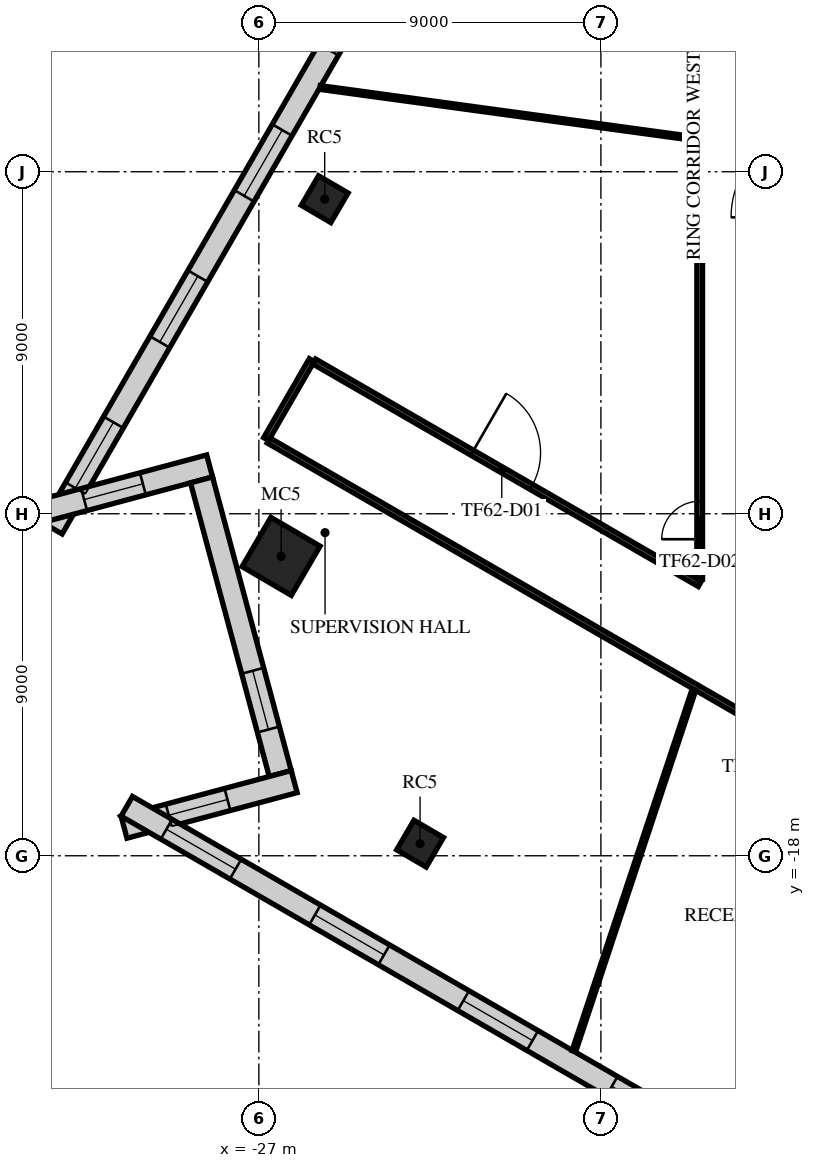
"""IFC4 building model, lengths in metres.
Left out: names, types, materials, properties, quantities, classifications, styles, units other than length and angle.
Written with IfcOpenShell. Run it as: python <this file> out.ifc"""

import sys

from ifc_helpers import new_model, si_unit, direction, frame, frame_2d, origin, origin_2d, place, context, subcontext, project, spatial, rectangle, extrude, element, fill, save


model = new_model("IFC4")
c1 = context("Model", 3, precision=1e-05, world=origin(), true_north=direction((0.0, 1.0)))
c2 = subcontext(c1, "Body", "Model", "MODEL_VIEW")
j1 = project(units=[si_unit("LENGTHUNIT", "METRE"), si_unit("PLANEANGLEUNIT", "RADIAN")], contexts=[c1])
p1 = place(None, origin())
s1 = spatial("IfcSite", under=j1, at=p1, CompositionType="ELEMENT")
p2 = place(p1, origin())
s2 = spatial("IfcBuilding", under=s1, at=p2, CompositionType="ELEMENT")
p3 = place(p2, frame((0.0, 0.0, 262.9)))
s3 = spatial("IfcBuildingStorey", under=s2, at=p3, CompositionType="ELEMENT", Elevation=262.9)
p4 = place(p3, frame((-25.268, -0.722, 0.0), z_axis=(0.0, 0.0, 1.0), x_axis=(0.504643651291, 0.863327739165, 0.0)))
e1 = element("IfcColumn", 1, at=p4, inside=s3, PredefinedType="COLUMN", context=c2, shape_type="SweptSolid", body=[
    extrude(rectangle(XDim=0.9, YDim=0.9, at=origin_2d()), origin(), (0.0, 0.0, 1.0), 4.0),
])
p5 = place(p3, frame((-26.415, -10.122, 0.0), z_axis=(0.0, 0.0, 1.0), x_axis=(0.504643651291, 0.863327739165, 0.0)))
e2 = element("IfcColumn", 2, at=p5, inside=s3, PredefinedType="COLUMN", context=c2, shape_type="SweptSolid", body=[
    extrude(rectangle(XDim=1.5, YDim=1.5, at=origin_2d()), origin(), (0.0, 0.0, 1.0), 4.0),
])
p6 = place(p3, frame((-22.758, -17.682, 0.0), z_axis=(0.0, 0.0, 1.0), x_axis=(0.504643651291, 0.863327739165, 0.0)))
e3 = element("IfcColumn", 3, at=p6, inside=s3, PredefinedType="COLUMN", context=c2, shape_type="SweptSolid", body=[
    extrude(rectangle(XDim=0.9, YDim=0.9, at=origin_2d()), origin(), (0.0, 0.0, 1.0), 4.0),
])
p7 = place(p3, frame((-8.015, 32.917, 0.0), z_axis=(0.0, 0.0, 1.0), x_axis=(-0.500001675963, -0.866024436165, 0.0)))
e4 = element("IfcWall", 4, at=p7, inside=s3, PredefinedType="STANDARD", context=c2, shape_type="SweptSolid", body=[
    extrude(rectangle(XDim=48.843, YDim=0.6, at=frame_2d((24.421, 0.0))), origin(), (0.0, 0.0, 1.0), 3.64),
])
p8 = place(p7, frame((1.22, 0.0, 0.9)))
e5 = element("IfcOpeningElement", 5, at=p8, cuts=e4, PredefinedType="OPENING", context=c2, shape_type="SweptSolid", body=[
    extrude(rectangle(XDim=2.0, YDim=2.1, at=frame_2d((1.0, 1.05))), frame((0.0, 0.31, 0.0), z_axis=(0.0, -1.0, 0.0), x_axis=(1.0, 0.0, 0.0)), (0.0, 0.0, 1.0), 0.62),
])
p9 = place(p7, frame((5.66, 0.0, 0.9)))
e6 = element("IfcOpeningElement", 6, at=p9, cuts=e4, PredefinedType="OPENING", context=c2, shape_type="SweptSolid", body=[
    extrude(rectangle(XDim=2.0, YDim=2.1, at=frame_2d((1.0, 1.05))), frame((0.0, 0.31, 0.0), z_axis=(0.0, -1.0, 0.0), x_axis=(1.0, 0.0, 0.0)), (0.0, 0.0, 1.0), 0.62),
])
p10 = place(p7, frame((10.101, 0.0, 0.9)))
e7 = element("IfcOpeningElement", 7, at=p10, cuts=e4, PredefinedType="OPENING", context=c2, shape_type="SweptSolid", body=[
    extrude(rectangle(XDim=2.0, YDim=2.1, at=frame_2d((1.0, 1.05))), frame((0.0, 0.31, 0.0), z_axis=(0.0, -1.0, 0.0), x_axis=(1.0, 0.0, 0.0)), (0.0, 0.0, 1.0), 0.62),
])
p11 = place(p7, frame((14.541, 0.0, 0.9)))
e8 = element("IfcOpeningElement", 8, at=p11, cuts=e4, PredefinedType="OPENING", context=c2, shape_type="SweptSolid", body=[
    extrude(rectangle(XDim=2.0, YDim=2.1, at=frame_2d((1.0, 1.05))), frame((0.0, 0.31, 0.0), z_axis=(0.0, -1.0, 0.0), x_axis=(1.0, 0.0, 0.0)), (0.0, 0.0, 1.0), 0.62),
])
p12 = place(p7, frame((18.981, 0.0, 0.9)))
e9 = element("IfcOpeningElement", 9, at=p12, cuts=e4, PredefinedType="OPENING", context=c2, shape_type="SweptSolid", body=[
    extrude(rectangle(XDim=2.0, YDim=2.1, at=frame_2d((1.0, 1.05))), frame((0.0, 0.31, 0.0), z_axis=(0.0, -1.0, 0.0), x_axis=(1.0, 0.0, 0.0)), (0.0, 0.0, 1.0), 0.62),
])
p13 = place(p7, frame((23.422, 0.0, 0.9)))
e10 = element("IfcOpeningElement", 10, at=p13, cuts=e4, PredefinedType="OPENING", context=c2, shape_type="SweptSolid", body=[
    extrude(rectangle(XDim=2.0, YDim=2.1, at=frame_2d((1.0, 1.05))), frame((0.0, 0.31, 0.0), z_axis=(0.0, -1.0, 0.0), x_axis=(1.0, 0.0, 0.0)), (0.0, 0.0, 1.0), 0.62),
])
p14 = place(p7, frame((27.862, 0.0, 0.9)))
e11 = element("IfcOpeningElement", 11, at=p14, cuts=e4, PredefinedType="OPENING", context=c2, shape_type="SweptSolid", body=[
    extrude(rectangle(XDim=2.0, YDim=2.1, at=frame_2d((1.0, 1.05))), frame((0.0, 0.31, 0.0), z_axis=(0.0, -1.0, 0.0), x_axis=(1.0, 0.0, 0.0)), (0.0, 0.0, 1.0), 0.62),
])
p15 = place(p7, frame((32.302, 0.0, 0.9)))
e12 = element("IfcOpeningElement", 12, at=p15, cuts=e4, PredefinedType="OPENING", context=c2, shape_type="SweptSolid", body=[
    extrude(rectangle(XDim=2.0, YDim=2.1, at=frame_2d((1.0, 1.05))), frame((0.0, 0.31, 0.0), z_axis=(0.0, -1.0, 0.0), x_axis=(1.0, 0.0, 0.0)), (0.0, 0.0, 1.0), 0.62),
])
p16 = place(p7, frame((36.742, 0.0, 0.9)))
e13 = element("IfcOpeningElement", 13, at=p16, cuts=e4, PredefinedType="OPENING", context=c2, shape_type="SweptSolid", body=[
    extrude(rectangle(XDim=2.0, YDim=2.1, at=frame_2d((1.0, 1.05))), frame((0.0, 0.31, 0.0), z_axis=(0.0, -1.0, 0.0), x_axis=(1.0, 0.0, 0.0)), (0.0, 0.0, 1.0), 0.62),
])
p17 = place(p7, frame((41.183, 0.0, 0.9)))
e14 = element("IfcOpeningElement", 14, at=p17, cuts=e4, PredefinedType="OPENING", context=c2, shape_type="SweptSolid", body=[
    extrude(rectangle(XDim=2.0, YDim=2.1, at=frame_2d((1.0, 1.05))), frame((0.0, 0.31, 0.0), z_axis=(0.0, -1.0, 0.0), x_axis=(1.0, 0.0, 0.0)), (0.0, 0.0, 1.0), 0.62),
])
p18 = place(p7, frame((45.623, 0.0, 0.9)))
e15 = element("IfcOpeningElement", 15, at=p18, cuts=e4, PredefinedType="OPENING", context=c2, shape_type="SweptSolid", body=[
    extrude(rectangle(XDim=2.0, YDim=2.1, at=frame_2d((1.0, 1.05))), frame((0.0, 0.31, 0.0), z_axis=(0.0, -1.0, 0.0), x_axis=(1.0, 0.0, 0.0)), (0.0, 0.0, 1.0), 0.62),
])
p19 = place(p3, frame((-32.774, -8.942, 0.0), z_axis=(0.0, 0.0, 1.0), x_axis=(0.965928304125, 0.258809797517, 0.0)))
e16 = element("IfcWall", 16, at=p19, inside=s3, PredefinedType="STANDARD", context=c2, shape_type="SweptSolid", body=[
    extrude(rectangle(XDim=4.635, YDim=0.6, at=frame_2d((2.318, 0.0))), origin(), (0.0, 0.0, 1.0), 3.64),
])
p20 = place(p19, frame((1.218, 0.0, 0.9)))
e17 = element("IfcOpeningElement", 17, at=p20, cuts=e16, PredefinedType="OPENING", context=c2, shape_type="SweptSolid", body=[
    extrude(rectangle(XDim=1.6, YDim=2.1, at=frame_2d((0.8, 1.05))), frame((0.0, 0.31, 0.0), z_axis=(0.0, -1.0, 0.0), x_axis=(1.0, 0.0, 0.0)), (0.0, 0.0, 1.0), 0.62),
])
p21 = place(p3, frame((-28.509, -8.11, 0.0), z_axis=(0.0, 0.0, 1.0), x_axis=(0.258815405168, -0.965926801599, 0.0)))
e18 = element("IfcWall", 18, at=p21, inside=s3, PredefinedType="STANDARD", context=c2, shape_type="SweptSolid", body=[
    extrude(rectangle(XDim=8.0, YDim=0.6, at=frame_2d((4.0, 0.0))), origin(), (0.0, 0.0, 1.0), 3.64),
])
p22 = place(p21, frame((5.2, 0.0, 0.9)))
e19 = element("IfcOpeningElement", 19, at=p22, cuts=e18, PredefinedType="OPENING", context=c2, shape_type="SweptSolid", body=[
    extrude(rectangle(XDim=1.6, YDim=2.1, at=frame_2d((0.8, 1.05))), frame((0.0, 0.31, 0.0), z_axis=(0.0, -1.0, 0.0), x_axis=(1.0, 0.0, 0.0)), (0.0, 0.0, 1.0), 0.62),
])
p23 = place(p3, frame((-26.071, -16.049, 0.0), z_axis=(0.0, 0.0, 1.0), x_axis=(-0.965928304125, -0.258809797517, 0.0)))
e20 = element("IfcWall", 20, at=p23, inside=s3, PredefinedType="STANDARD", context=c2, shape_type="SweptSolid", body=[
    extrude(rectangle(XDim=4.635, YDim=0.6, at=frame_2d((2.318, 0.0))), origin(), (0.0, 0.0, 1.0), 3.64),
])
p24 = place(p23, frame((1.818, 0.0, 0.9)))
e21 = element("IfcOpeningElement", 21, at=p24, cuts=e20, PredefinedType="OPENING", context=c2, shape_type="SweptSolid", body=[
    extrude(rectangle(XDim=1.6, YDim=2.1, at=frame_2d((0.8, 1.05))), frame((0.0, 0.31, 0.0), z_axis=(0.0, -1.0, 0.0), x_axis=(1.0, 0.0, 0.0)), (0.0, 0.0, 1.0), 0.62),
])
p25 = place(p3, frame((-30.476, -16.699, 0.0), z_axis=(0.0, 0.0, 1.0), x_axis=(0.866027969777, -0.499995555543, 0.0)))
e22 = element("IfcWall", 22, at=p25, inside=s3, PredefinedType="STANDARD", context=c2, shape_type="SweptSolid", body=[
    extrude(rectangle(XDim=36.086, YDim=0.6, at=frame_2d((18.043, 0.0))), origin(), (0.0, 0.0, 1.0), 3.64),
])
p26 = place(p25, frame((1.205, 0.0, 0.9)))
e23 = element("IfcOpeningElement", 23, at=p26, cuts=e22, PredefinedType="OPENING", context=c2, shape_type="SweptSolid", body=[
    extrude(rectangle(XDim=2.1, YDim=2.1, at=frame_2d((1.05, 1.05))), frame((0.0, 0.31, 0.0), z_axis=(0.0, -1.0, 0.0), x_axis=(1.0, 0.0, 0.0)), (0.0, 0.0, 1.0), 0.62),
])
p27 = place(p25, frame((5.716, 0.0, 0.9)))
e24 = element("IfcOpeningElement", 24, at=p27, cuts=e22, PredefinedType="OPENING", context=c2, shape_type="SweptSolid", body=[
    extrude(rectangle(XDim=2.1, YDim=2.1, at=frame_2d((1.05, 1.05))), frame((0.0, 0.31, 0.0), z_axis=(0.0, -1.0, 0.0), x_axis=(1.0, 0.0, 0.0)), (0.0, 0.0, 1.0), 0.62),
])
p28 = place(p25, frame((10.227, 0.0, 0.9)))
e25 = element("IfcOpeningElement", 25, at=p28, cuts=e22, PredefinedType="OPENING", context=c2, shape_type="SweptSolid", body=[
    extrude(rectangle(XDim=2.1, YDim=2.1, at=frame_2d((1.05, 1.05))), frame((0.0, 0.31, 0.0), z_axis=(0.0, -1.0, 0.0), x_axis=(1.0, 0.0, 0.0)), (0.0, 0.0, 1.0), 0.62),
])
p29 = place(p25, frame((14.738, 0.0, 0.9)))
e26 = element("IfcOpeningElement", 26, at=p29, cuts=e22, PredefinedType="OPENING", context=c2, shape_type="SweptSolid", body=[
    extrude(rectangle(XDim=2.1, YDim=2.1, at=frame_2d((1.05, 1.05))), frame((0.0, 0.31, 0.0), z_axis=(0.0, -1.0, 0.0), x_axis=(1.0, 0.0, 0.0)), (0.0, 0.0, 1.0), 0.62),
])
p30 = place(p25, frame((19.249, 0.0, 0.9)))
e27 = element("IfcOpeningElement", 27, at=p30, cuts=e22, PredefinedType="OPENING", context=c2, shape_type="SweptSolid", body=[
    extrude(rectangle(XDim=2.1, YDim=2.1, at=frame_2d((1.05, 1.05))), frame((0.0, 0.31, 0.0), z_axis=(0.0, -1.0, 0.0), x_axis=(1.0, 0.0, 0.0)), (0.0, 0.0, 1.0), 0.62),
])
p31 = place(p25, frame((23.759, 0.0, 0.9)))
e28 = element("IfcOpeningElement", 28, at=p31, cuts=e22, PredefinedType="OPENING", context=c2, shape_type="SweptSolid", body=[
    extrude(rectangle(XDim=2.1, YDim=2.1, at=frame_2d((1.05, 1.05))), frame((0.0, 0.31, 0.0), z_axis=(0.0, -1.0, 0.0), x_axis=(1.0, 0.0, 0.0)), (0.0, 0.0, 1.0), 0.62),
])
p32 = place(p25, frame((28.27, 0.0, 0.9)))
e29 = element("IfcOpeningElement", 29, at=p32, cuts=e22, PredefinedType="OPENING", context=c2, shape_type="SweptSolid", body=[
    extrude(rectangle(XDim=2.1, YDim=2.1, at=frame_2d((1.05, 1.05))), frame((0.0, 0.31, 0.0), z_axis=(0.0, -1.0, 0.0), x_axis=(1.0, 0.0, 0.0)), (0.0, 0.0, 1.0), 0.62),
])
p33 = place(p25, frame((32.781, 0.0, 0.9)))
e30 = element("IfcOpeningElement", 30, at=p33, cuts=e22, PredefinedType="OPENING", context=c2, shape_type="SweptSolid", body=[
    extrude(rectangle(XDim=2.1, YDim=2.1, at=frame_2d((1.05, 1.05))), frame((0.0, 0.31, 0.0), z_axis=(0.0, -1.0, 0.0), x_axis=(1.0, 0.0, 0.0)), (0.0, 0.0, 1.0), 0.62),
])
p34 = place(p3, frame((-26.809, -7.035, 0.0), z_axis=(0.0, 0.0, 1.0), x_axis=(0.499989508258, 0.86603146111, 0.0)))
e31 = element("IfcWall", 31, at=p34, inside=s3, PredefinedType="PARTITIONING", context=c2, shape_type="SweptSolid", body=[
    extrude(rectangle(XDim=2.4, YDim=0.15, at=frame_2d((1.2, 0.0))), origin(), (0.0, 0.0, 1.0), 3.04),
])
p35 = place(p3, frame((-26.744, -7.073, 0.0), z_axis=(0.0, 0.0, 1.0), x_axis=(0.866020890374, -0.500007817374, 0.0)))
e32 = element("IfcWall", 32, at=p35, inside=s3, PredefinedType="PARTITIONING", context=c2, shape_type="SweptSolid", body=[
    extrude(rectangle(XDim=39.324, YDim=0.15, at=frame_2d((19.662, 0.0))), origin(), (0.0, 0.0, 1.0), 3.04),
])
p36 = place(p35, frame((14.505, 0.0, 0.0)))
e33 = element("IfcOpeningElement", 33, at=p36, cuts=e32, PredefinedType="OPENING", context=c2, shape_type="SweptSolid", body=[
    extrude(rectangle(XDim=1.0, YDim=2.1, at=frame_2d((0.5, 1.05))), frame((0.0, 0.085, 0.0), z_axis=(0.0, -1.0, 0.0), x_axis=(1.0, 0.0, 0.0)), (0.0, 0.0, 1.0), 0.17),
])
p37 = place(p35, frame((22.632, 0.0, 0.0)))
e34 = element("IfcOpeningElement", 34, at=p37, cuts=e32, PredefinedType="OPENING", context=c2, shape_type="SweptSolid", body=[
    extrude(rectangle(XDim=1.0, YDim=2.1, at=frame_2d((0.5, 1.05))), frame((0.0, 0.085, 0.0), z_axis=(0.0, -1.0, 0.0), x_axis=(1.0, 0.0, 0.0)), (0.0, 0.0, 1.0), 0.17),
])
p38 = place(p35, frame((36.852, 0.0, 0.0)))
e35 = element("IfcOpeningElement", 35, at=p38, cuts=e32, PredefinedType="OPENING", context=c2, shape_type="SweptSolid", body=[
    extrude(rectangle(XDim=1.8, YDim=2.1, at=frame_2d((0.9, 1.05))), frame((0.0, 0.085, 0.0), z_axis=(0.0, -1.0, 0.0), x_axis=(1.0, 0.0, 0.0)), (0.0, 0.0, 1.0), 0.17),
])
p39 = place(p35, frame((29.852, 0.0, 0.0)))
e36 = element("IfcOpeningElement", 36, at=p39, cuts=e32, PredefinedType="OPENING", context=c2, shape_type="SweptSolid", body=[
    extrude(rectangle(XDim=1.0, YDim=2.1, at=frame_2d((0.5, 1.05))), frame((0.0, 0.085, 0.0), z_axis=(0.0, -1.0, 0.0), x_axis=(1.0, 0.0, 0.0)), (0.0, 0.0, 1.0), 0.17),
])
p40 = place(p3, frame((-25.544, -4.993, 0.0), z_axis=(0.0, 0.0, 1.0), x_axis=(0.865988432642, -0.50006403043, 0.0)))
e37 = element("IfcWall", 37, at=p40, inside=s3, PredefinedType="PARTITIONING", context=c2, shape_type="SweptSolid", body=[
    extrude(rectangle(XDim=11.714, YDim=0.15, at=frame_2d((5.857, 0.0))), origin(), (0.0, 0.0, 1.0), 3.04),
])
p41 = place(p40, frame((4.8, 0.0, 0.0)))
e38 = element("IfcOpeningElement", 38, at=p41, cuts=e37, PredefinedType="OPENING", context=c2, shape_type="SweptSolid", body=[
    extrude(rectangle(XDim=1.8, YDim=2.1, at=frame_2d((0.9, 1.05))), frame((0.0, 0.085, 0.0), z_axis=(0.0, -1.0, 0.0), x_axis=(1.0, 0.0, 0.0)), (0.0, 0.0, 1.0), 0.17),
])
p42 = place(p3, frame((-15.4, -10.72, 0.0), z_axis=(0.0, 0.0, 1.0), x_axis=(0.0, 1.0, 0.0)))
e39 = element("IfcWall", 39, at=p42, inside=s3, PredefinedType="PARTITIONING", context=c2, shape_type="SweptSolid", body=[
    extrude(rectangle(XDim=26.12, YDim=0.15, at=frame_2d((13.06, 0.0))), origin(), (0.0, 0.0, 1.0), 3.24),
])
p43 = place(p42, frame((1.05, 0.0, 0.0)))
e40 = element("IfcOpeningElement", 40, at=p43, cuts=e39, PredefinedType="OPENING", context=c2, shape_type="SweptSolid", body=[
    extrude(rectangle(XDim=1.0, YDim=2.1, at=frame_2d((0.5, 1.05))), frame((0.0, 0.085, 0.0), z_axis=(0.0, -1.0, 0.0), x_axis=(1.0, 0.0, 0.0)), (0.0, 0.0, 1.0), 0.17),
])
p44 = place(p42, frame((15.124, 0.0, 0.0)))
e41 = element("IfcOpeningElement", 41, at=p44, cuts=e39, PredefinedType="OPENING", context=c2, shape_type="SweptSolid", body=[
    extrude(rectangle(XDim=1.0, YDim=2.1, at=frame_2d((0.5, 1.05))), frame((0.0, 0.085, 0.0), z_axis=(0.0, -1.0, 0.0), x_axis=(1.0, 0.0, 0.0)), (0.0, 0.0, 1.0), 0.17),
])
p45 = place(p3, frame((-25.391, 2.217, 0.0), z_axis=(0.0, 0.0, 1.0), x_axis=(0.990810103631, -0.135260262244, 0.0)))
e42 = element("IfcWall", 42, at=p45, inside=s3, PredefinedType="PARTITIONING", context=c2, shape_type="SweptSolid", body=[
    extrude(rectangle(XDim=10.001, YDim=0.1, at=frame_2d((5.0, 0.0))), origin(), (0.0, 0.0, 1.0), 3.04),
])
p46 = place(p3, frame((-18.711, -23.143, 0.0), z_axis=(0.0, 0.0, 1.0), x_axis=(0.315197061925, 0.949026244186, 0.0)))
e43 = element("IfcWall", 43, at=p46, inside=s3, PredefinedType="PARTITIONING", context=c2, shape_type="SweptSolid", body=[
    extrude(rectangle(XDim=10.021, YDim=0.1, at=frame_2d((5.011, 0.0))), origin(), (0.0, 0.0, 1.0), 3.04),
])
p47 = place(p3, frame((-14.64, -25.493, 0.0), z_axis=(0.0, 0.0, 1.0), x_axis=(0.596096620962, 0.802912709127, 0.0)))
e44 = element("IfcWall", 44, at=p47, inside=s3, PredefinedType="PARTITIONING", context=c2, shape_type="SweptSolid", body=[
    extrude(rectangle(XDim=9.885, YDim=0.1, at=frame_2d((4.943, 0.0))), origin(), (0.0, 0.0, 1.0), 3.04),
])
p48 = place(p16, origin())
e45 = element("IfcWindow", 45, at=p48, inside=s3, PartitioningType="SINGLE_PANEL", PredefinedType="WINDOW", context=c2, shape_type="SweptSolid", body=[
    extrude(rectangle(XDim=2.0, YDim=2.1, at=frame_2d((1.0, 1.05))), frame((0.0, 0.03, 0.0), z_axis=(0.0, -1.0, 0.0), x_axis=(1.0, 0.0, 0.0)), (0.0, 0.0, 1.0), 0.06),
])
fill(e13, e45)
p49 = place(p17, origin())
e46 = element("IfcWindow", 46, at=p49, inside=s3, PartitioningType="SINGLE_PANEL", PredefinedType="WINDOW", context=c2, shape_type="SweptSolid", body=[
    extrude(rectangle(XDim=2.0, YDim=2.1, at=frame_2d((1.0, 1.05))), frame((0.0, 0.03, 0.0), z_axis=(0.0, -1.0, 0.0), x_axis=(1.0, 0.0, 0.0)), (0.0, 0.0, 1.0), 0.06),
])
fill(e14, e46)
p50 = place(p18, origin())
e47 = element("IfcWindow", 47, at=p50, inside=s3, PartitioningType="SINGLE_PANEL", PredefinedType="WINDOW", context=c2, shape_type="SweptSolid", body=[
    extrude(rectangle(XDim=2.0, YDim=2.1, at=frame_2d((1.0, 1.05))), frame((0.0, 0.03, 0.0), z_axis=(0.0, -1.0, 0.0), x_axis=(1.0, 0.0, 0.0)), (0.0, 0.0, 1.0), 0.06),
])
fill(e15, e47)
p51 = place(p20, origin())
e48 = element("IfcWindow", 48, at=p51, inside=s3, PartitioningType="SINGLE_PANEL", PredefinedType="WINDOW", context=c2, shape_type="SweptSolid", body=[
    extrude(rectangle(XDim=1.6, YDim=2.1, at=frame_2d((0.8, 1.05))), frame((0.0, 0.03, 0.0), z_axis=(0.0, -1.0, 0.0), x_axis=(1.0, 0.0, 0.0)), (0.0, 0.0, 1.0), 0.06),
])
fill(e17, e48)
p52 = place(p22, origin())
e49 = element("IfcWindow", 49, at=p52, inside=s3, PartitioningType="SINGLE_PANEL", PredefinedType="WINDOW", context=c2, shape_type="SweptSolid", body=[
    extrude(rectangle(XDim=1.6, YDim=2.1, at=frame_2d((0.8, 1.05))), frame((0.0, 0.03, 0.0), z_axis=(0.0, -1.0, 0.0), x_axis=(1.0, 0.0, 0.0)), (0.0, 0.0, 1.0), 0.06),
])
fill(e19, e49)
p53 = place(p24, origin())
e50 = element("IfcWindow", 50, at=p53, inside=s3, PartitioningType="SINGLE_PANEL", PredefinedType="WINDOW", context=c2, shape_type="SweptSolid", body=[
    extrude(rectangle(XDim=1.6, YDim=2.1, at=frame_2d((0.8, 1.05))), frame((0.0, 0.03, 0.0), z_axis=(0.0, -1.0, 0.0), x_axis=(1.0, 0.0, 0.0)), (0.0, 0.0, 1.0), 0.06),
])
fill(e21, e50)
p54 = place(p26, origin())
e51 = element("IfcWindow", 51, at=p54, inside=s3, PartitioningType="SINGLE_PANEL", PredefinedType="WINDOW", context=c2, shape_type="SweptSolid", body=[
    extrude(rectangle(XDim=2.1, YDim=2.1, at=frame_2d((1.05, 1.05))), frame((0.0, 0.03, 0.0), z_axis=(0.0, -1.0, 0.0), x_axis=(1.0, 0.0, 0.0)), (0.0, 0.0, 1.0), 0.06),
])
fill(e23, e51)
p55 = place(p27, origin())
e52 = element("IfcWindow", 52, at=p55, inside=s3, PartitioningType="SINGLE_PANEL", PredefinedType="WINDOW", context=c2, shape_type="SweptSolid", body=[
    extrude(rectangle(XDim=2.1, YDim=2.1, at=frame_2d((1.05, 1.05))), frame((0.0, 0.03, 0.0), z_axis=(0.0, -1.0, 0.0), x_axis=(1.0, 0.0, 0.0)), (0.0, 0.0, 1.0), 0.06),
])
fill(e24, e52)
p56 = place(p28, origin())
e53 = element("IfcWindow", 53, at=p56, inside=s3, PartitioningType="SINGLE_PANEL", PredefinedType="WINDOW", context=c2, shape_type="SweptSolid", body=[
    extrude(rectangle(XDim=2.1, YDim=2.1, at=frame_2d((1.05, 1.05))), frame((0.0, 0.03, 0.0), z_axis=(0.0, -1.0, 0.0), x_axis=(1.0, 0.0, 0.0)), (0.0, 0.0, 1.0), 0.06),
])
fill(e25, e53)
p57 = place(p29, origin())
e54 = element("IfcWindow", 54, at=p57, inside=s3, PartitioningType="SINGLE_PANEL", PredefinedType="WINDOW", context=c2, shape_type="SweptSolid", body=[
    extrude(rectangle(XDim=2.1, YDim=2.1, at=frame_2d((1.05, 1.05))), frame((0.0, 0.03, 0.0), z_axis=(0.0, -1.0, 0.0), x_axis=(1.0, 0.0, 0.0)), (0.0, 0.0, 1.0), 0.06),
])
fill(e26, e54)
p58 = place(p41, origin())
e55 = element("IfcDoor", 55, at=p58, inside=s3, OperationType="DOUBLE_DOOR_SINGLE_SWING", PredefinedType="DOOR", context=c2, shape_type="SweptSolid", body=[
    extrude(rectangle(XDim=1.8, YDim=2.1, at=frame_2d((0.9, 1.05))), frame((0.0, 0.025, 0.0), z_axis=(0.0, -1.0, 0.0), x_axis=(1.0, 0.0, 0.0)), (0.0, 0.0, 1.0), 0.05),
])
fill(e38, e55)
p59 = place(p43, origin())
e56 = element("IfcDoor", 56, at=p59, inside=s3, OperationType="SINGLE_SWING_LEFT", PredefinedType="DOOR", context=c2, shape_type="SweptSolid", body=[
    extrude(rectangle(XDim=1.0, YDim=2.1, at=frame_2d((0.5, 1.05))), frame((0.0, 0.025, 0.0), z_axis=(0.0, -1.0, 0.0), x_axis=(1.0, 0.0, 0.0)), (0.0, 0.0, 1.0), 0.05),
])
fill(e40, e56)
save(model, sys.argv[1])
